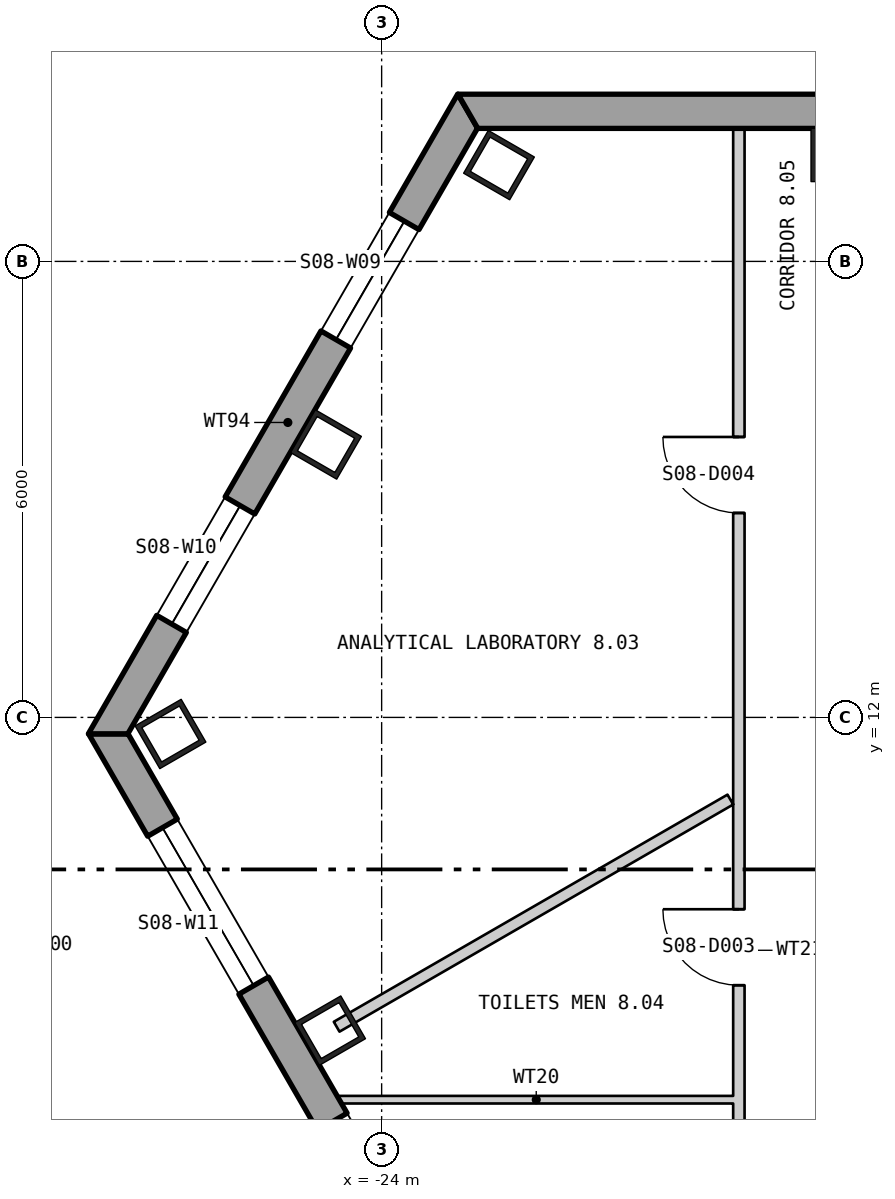
"""IFC4 building model, lengths in metres.
Left out: names, types, materials, properties, quantities, classifications, styles, units other than length and angle.
Written with IfcOpenShell. Run it as: python <this file> out.ifc"""

import sys

from ifc_helpers import new_model, si_unit, direction, frame, frame_2d, origin, origin_2d, place, context, subcontext, project, spatial, polyline, rectangle, hollow_rectangle, outline, extrude, element, fill, save


model = new_model("IFC4")
c1 = context("Model", 3, precision=1e-05, world=origin(), true_north=direction((0.0, 1.0)))
c2 = subcontext(c1, "Body", "Model", "MODEL_VIEW")
j1 = project(units=[si_unit("LENGTHUNIT", "METRE"), si_unit("PLANEANGLEUNIT", "RADIAN")], contexts=[c1])
p1 = place(None, origin())
s1 = spatial("IfcSite", under=j1, at=p1, CompositionType="ELEMENT")
p2 = place(p1, origin())
s2 = spatial("IfcBuilding", under=s1, at=p2, CompositionType="ELEMENT")
p3 = place(p2, frame((0.0, 0.0, 111.3)))
s3 = spatial("IfcBuildingStorey", under=s2, at=p3, CompositionType="ELEMENT", Elevation=111.3)
for number, where, z_axis, x_axis in (
    (1, (-18.026, 19.4, 0.0), (0.0, 0.0, 1.0), (-1.0, 0.0, 0.0)),
    (2, (-22.456, 19.267, 0.0), (0.0, 0.0, 1.0), (-0.5, -0.866, 0.0)),
    (3, (-24.732, 15.591, 0.0), (0.0, 0.0, 1.0), (-0.5, -0.866, 0.0)),
    (4, (-26.778, 11.782, 0.0), (0.0, 0.0, 1.0), (0.5, -0.866, 0.0)),
    (5, (-24.678, 7.879, 0.0), (0.0, 0.0, 1.0), (0.5, -0.866, 0.0)),
):
    element("IfcColumn", number, at=place(p3, frame(where, z_axis=z_axis, x_axis=x_axis)), inside=s3, PredefinedType="COLUMN", context=c2, shape_type="SweptSolid", body=[
        extrude(hollow_rectangle(XDim=0.65, YDim=0.7, WallThickness=0.065, at=origin_2d()), origin(), (0.0, 0.0, 1.0), 4.5),
    ])
p4 = place(p3, frame((22.865, 19.975, -0.4), z_axis=(0.0, 0.0, 1.0), x_axis=(-1.0, 0.0, 0.0)))
e6 = element("IfcWall", 6, at=p4, inside=s3, PredefinedType="SOLIDWALL", context=c2, shape_type="SweptSolid", body=[
    extrude(outline(polyline([(-0.13, -0.225), (45.86, -0.225), (45.6, 0.225), (0.13, 0.225), (-0.13, -0.225)])), origin(), (0.0, 0.0, 1.0), 4.5),
])
p5 = place(p4, frame((5.892, 0.0, 1.3)))
e7 = element("IfcOpeningElement", 7, at=p5, cuts=e6, PredefinedType="OPENING", context=c2, shape_type="SweptSolid", body=[
    extrude(rectangle(XDim=2.4, YDim=2.6, at=frame_2d((1.2, 1.3))), frame((0.0, 0.235, 0.0), z_axis=(0.0, -1.0, 0.0), x_axis=(1.0, 0.0, 0.0)), (0.0, 0.0, 1.0), 0.47),
])
p6 = place(p4, frame((10.399, 0.0, 1.3)))
e8 = element("IfcOpeningElement", 8, at=p6, cuts=e6, PredefinedType="OPENING", context=c2, shape_type="SweptSolid", body=[
    extrude(rectangle(XDim=2.4, YDim=2.6, at=frame_2d((1.2, 1.3))), frame((0.0, 0.235, 0.0), z_axis=(0.0, -1.0, 0.0), x_axis=(1.0, 0.0, 0.0)), (0.0, 0.0, 1.0), 0.47),
])
p7 = place(p4, frame((14.905, 0.0, 1.3)))
e9 = element("IfcOpeningElement", 9, at=p7, cuts=e6, PredefinedType="OPENING", context=c2, shape_type="SweptSolid", body=[
    extrude(rectangle(XDim=2.4, YDim=2.6, at=frame_2d((1.2, 1.3))), frame((0.0, 0.235, 0.0), z_axis=(0.0, -1.0, 0.0), x_axis=(1.0, 0.0, 0.0)), (0.0, 0.0, 1.0), 0.47),
])
p8 = place(p4, frame((19.412, 0.0, 1.3)))
e10 = element("IfcOpeningElement", 10, at=p8, cuts=e6, PredefinedType="OPENING", context=c2, shape_type="SweptSolid", body=[
    extrude(rectangle(XDim=2.4, YDim=2.6, at=frame_2d((1.2, 1.3))), frame((0.0, 0.235, 0.0), z_axis=(0.0, -1.0, 0.0), x_axis=(1.0, 0.0, 0.0)), (0.0, 0.0, 1.0), 0.47),
])
p9 = place(p4, frame((23.918, 0.0, 1.3)))
e11 = element("IfcOpeningElement", 11, at=p9, cuts=e6, PredefinedType="OPENING", context=c2, shape_type="SweptSolid", body=[
    extrude(rectangle(XDim=2.4, YDim=2.6, at=frame_2d((1.2, 1.3))), frame((0.0, 0.235, 0.0), z_axis=(0.0, -1.0, 0.0), x_axis=(1.0, 0.0, 0.0)), (0.0, 0.0, 1.0), 0.47),
])
p10 = place(p4, frame((28.425, 0.0, 1.3)))
e12 = element("IfcOpeningElement", 12, at=p10, cuts=e6, PredefinedType="OPENING", context=c2, shape_type="SweptSolid", body=[
    extrude(rectangle(XDim=2.4, YDim=2.6, at=frame_2d((1.2, 1.3))), frame((0.0, 0.235, 0.0), z_axis=(0.0, -1.0, 0.0), x_axis=(1.0, 0.0, 0.0)), (0.0, 0.0, 1.0), 0.47),
])
p11 = place(p4, frame((32.932, 0.0, 1.3)))
e13 = element("IfcOpeningElement", 13, at=p11, cuts=e6, PredefinedType="OPENING", context=c2, shape_type="SweptSolid", body=[
    extrude(rectangle(XDim=2.4, YDim=2.6, at=frame_2d((1.2, 1.3))), frame((0.0, 0.235, 0.0), z_axis=(0.0, -1.0, 0.0), x_axis=(1.0, 0.0, 0.0)), (0.0, 0.0, 1.0), 0.47),
])
p12 = place(p4, frame((37.438, 0.0, 1.3)))
e14 = element("IfcOpeningElement", 14, at=p12, cuts=e6, PredefinedType="OPENING", context=c2, shape_type="SweptSolid", body=[
    extrude(rectangle(XDim=2.4, YDim=2.6, at=frame_2d((1.2, 1.3))), frame((0.0, 0.235, 0.0), z_axis=(0.0, -1.0, 0.0), x_axis=(1.0, 0.0, 0.0)), (0.0, 0.0, 1.0), 0.47),
])
p13 = place(p3, frame((-22.869, 19.977, -0.4), z_axis=(0.0, 0.0, 1.0), x_axis=(-0.499998788182, -0.866026103427, 0.0)))
e15 = element("IfcWall", 15, at=p13, inside=s3, PredefinedType="SOLIDWALL", context=c2, shape_type="SweptSolid", body=[
    extrude(outline(polyline([(-0.13, -0.225), (9.59, -0.225), (9.33, 0.225), (0.13, 0.225), (-0.13, -0.225)])), origin(), (0.0, 0.0, 1.0), 4.5),
])
p14 = place(p13, frame((1.669, 0.0, 1.3)))
e16 = element("IfcOpeningElement", 16, at=p14, cuts=e15, PredefinedType="OPENING", context=c2, shape_type="SweptSolid", body=[
    extrude(rectangle(XDim=1.8, YDim=2.6, at=frame_2d((0.9, 1.3))), frame((0.0, 0.235, 0.0), z_axis=(0.0, -1.0, 0.0), x_axis=(1.0, 0.0, 0.0)), (0.0, 0.0, 1.0), 0.47),
])
p15 = place(p13, frame((5.991, 0.0, 1.3)))
e17 = element("IfcOpeningElement", 17, at=p15, cuts=e15, PredefinedType="OPENING", context=c2, shape_type="SweptSolid", body=[
    extrude(rectangle(XDim=1.8, YDim=2.6, at=frame_2d((0.9, 1.3))), frame((0.0, 0.235, 0.0), z_axis=(0.0, -1.0, 0.0), x_axis=(1.0, 0.0, 0.0)), (0.0, 0.0, 1.0), 0.47),
])
p16 = place(p3, frame((-27.595, 11.782, -0.18), z_axis=(0.0, 0.0, 1.0), x_axis=(0.500000141277, -0.866025322218, 0.0)))
e18 = element("IfcWall", 18, at=p16, inside=s3, PredefinedType="SOLIDWALL", context=c2, shape_type="SweptSolid", body=[
    extrude(outline(polyline([(-0.13, -0.225), (45.86, -0.225), (45.6, 0.225), (0.13, 0.225), (-0.13, -0.225)])), origin(), (0.0, 0.0, 1.0), 4.28),
])
p17 = place(p16, frame((1.424, 0.0, 1.08)))
e19 = element("IfcOpeningElement", 19, at=p17, cuts=e18, PredefinedType="OPENING", context=c2, shape_type="SweptSolid", body=[
    extrude(rectangle(XDim=2.4, YDim=2.6, at=frame_2d((1.2, 1.3))), frame((0.0, 0.235, 0.0), z_axis=(0.0, -1.0, 0.0), x_axis=(1.0, 0.0, 0.0)), (0.0, 0.0, 1.0), 0.47),
])
p18 = place(p16, frame((5.892, 0.0, 1.08)))
e20 = element("IfcOpeningElement", 20, at=p18, cuts=e18, PredefinedType="OPENING", context=c2, shape_type="SweptSolid", body=[
    extrude(rectangle(XDim=2.4, YDim=2.6, at=frame_2d((1.2, 1.3))), frame((0.0, 0.235, 0.0), z_axis=(0.0, -1.0, 0.0), x_axis=(1.0, 0.0, 0.0)), (0.0, 0.0, 1.0), 0.47),
])
p19 = place(p16, frame((10.399, 0.0, 1.08)))
e21 = element("IfcOpeningElement", 21, at=p19, cuts=e18, PredefinedType="OPENING", context=c2, shape_type="SweptSolid", body=[
    extrude(rectangle(XDim=2.4, YDim=2.6, at=frame_2d((1.2, 1.3))), frame((0.0, 0.235, 0.0), z_axis=(0.0, -1.0, 0.0), x_axis=(1.0, 0.0, 0.0)), (0.0, 0.0, 1.0), 0.47),
])
p20 = place(p16, frame((14.905, 0.0, 1.08)))
e22 = element("IfcOpeningElement", 22, at=p20, cuts=e18, PredefinedType="OPENING", context=c2, shape_type="SweptSolid", body=[
    extrude(rectangle(XDim=2.4, YDim=2.6, at=frame_2d((1.2, 1.3))), frame((0.0, 0.235, 0.0), z_axis=(0.0, -1.0, 0.0), x_axis=(1.0, 0.0, 0.0)), (0.0, 0.0, 1.0), 0.47),
])
p21 = place(p16, frame((19.412, 0.0, 1.08)))
e23 = element("IfcOpeningElement", 23, at=p21, cuts=e18, PredefinedType="OPENING", context=c2, shape_type="SweptSolid", body=[
    extrude(rectangle(XDim=2.4, YDim=2.6, at=frame_2d((1.2, 1.3))), frame((0.0, 0.235, 0.0), z_axis=(0.0, -1.0, 0.0), x_axis=(1.0, 0.0, 0.0)), (0.0, 0.0, 1.0), 0.47),
])
p22 = place(p16, frame((23.918, 0.0, 1.08)))
e24 = element("IfcOpeningElement", 24, at=p22, cuts=e18, PredefinedType="OPENING", context=c2, shape_type="SweptSolid", body=[
    extrude(rectangle(XDim=2.4, YDim=2.6, at=frame_2d((1.2, 1.3))), frame((0.0, 0.235, 0.0), z_axis=(0.0, -1.0, 0.0), x_axis=(1.0, 0.0, 0.0)), (0.0, 0.0, 1.0), 0.47),
])
p23 = place(p16, frame((28.425, 0.0, 1.08)))
e25 = element("IfcOpeningElement", 25, at=p23, cuts=e18, PredefinedType="OPENING", context=c2, shape_type="SweptSolid", body=[
    extrude(rectangle(XDim=2.4, YDim=2.6, at=frame_2d((1.2, 1.3))), frame((0.0, 0.235, 0.0), z_axis=(0.0, -1.0, 0.0), x_axis=(1.0, 0.0, 0.0)), (0.0, 0.0, 1.0), 0.47),
])
p24 = place(p16, frame((32.932, 0.0, 1.08)))
e26 = element("IfcOpeningElement", 26, at=p24, cuts=e18, PredefinedType="OPENING", context=c2, shape_type="SweptSolid", body=[
    extrude(rectangle(XDim=2.4, YDim=2.6, at=frame_2d((1.2, 1.3))), frame((0.0, 0.235, 0.0), z_axis=(0.0, -1.0, 0.0), x_axis=(1.0, 0.0, 0.0)), (0.0, 0.0, 1.0), 0.47),
])
p25 = place(p16, frame((37.438, 0.0, 1.08)))
e27 = element("IfcOpeningElement", 27, at=p25, cuts=e18, PredefinedType="OPENING", context=c2, shape_type="SweptSolid", body=[
    extrude(rectangle(XDim=2.4, YDim=2.6, at=frame_2d((1.2, 1.3))), frame((0.0, 0.235, 0.0), z_axis=(0.0, -1.0, 0.0), x_axis=(1.0, 0.0, 0.0)), (0.0, 0.0, 1.0), 0.47),
])
p26 = place(p16, frame((41.907, 0.0, 1.08)))
e28 = element("IfcOpeningElement", 28, at=p26, cuts=e18, PredefinedType="OPENING", context=c2, shape_type="SweptSolid", body=[
    extrude(rectangle(XDim=2.4, YDim=2.6, at=frame_2d((1.2, 1.3))), frame((0.0, 0.235, 0.0), z_axis=(0.0, -1.0, 0.0), x_axis=(1.0, 0.0, 0.0)), (0.0, 0.0, 1.0), 0.47),
])
p27 = place(p3, frame((-24.592, 7.93, 0.0), z_axis=(0.0, 0.0, 1.0), x_axis=(0.866146611104, 0.499790003975, 0.0)))
e29 = element("IfcWall", 29, at=p27, inside=s3, PredefinedType="PARTITIONING", context=c2, shape_type="SweptSolid", body=[
    extrude(rectangle(XDim=5.981, YDim=0.15, at=frame_2d((2.99, 0.0))), origin(), (0.0, 0.0, 1.0), 4.3),
])
p28 = place(p3, frame((-24.557, 6.97, 0.0), z_axis=(0.0, 0.0, 1.0), x_axis=(1.0, 0.0, 0.0)))
e30 = element("IfcWall", 30, at=p28, inside=s3, PredefinedType="PARTITIONING", context=c2, shape_type="SweptSolid", body=[
    extrude(rectangle(XDim=5.182, YDim=0.1, at=frame_2d((2.591, 0.0))), origin(), (0.0, 0.0, 1.0), 4.3),
])
p29 = place(p3, frame((-19.3, -1.875, 0.0), z_axis=(0.0, 0.0, 1.0), x_axis=(0.0, 1.0, 0.0)))
e31 = element("IfcWall", 31, at=p29, inside=s3, PredefinedType="PARTITIONING", context=c2, shape_type="SweptSolid", body=[
    extrude(rectangle(XDim=21.622, YDim=0.15, at=frame_2d((10.811, 0.0))), origin(), (0.0, 0.0, 1.0), 4.3),
])
p30 = place(p29, frame((4.595, 0.0, 0.0)))
e32 = element("IfcOpeningElement", 32, at=p30, cuts=e31, PredefinedType="OPENING", context=c2, shape_type="SweptSolid", body=[
    extrude(rectangle(XDim=1.0, YDim=2.1, at=frame_2d((0.5, 1.05))), frame((0.0, 0.085, 0.0), z_axis=(0.0, -1.0, 0.0), x_axis=(1.0, 0.0, 0.0)), (0.0, 0.0, 1.0), 0.17),
])
p31 = place(p29, frame((6.82, 0.0, 0.0)))
e33 = element("IfcOpeningElement", 33, at=p31, cuts=e31, PredefinedType="OPENING", context=c2, shape_type="SweptSolid", body=[
    extrude(rectangle(XDim=1.0, YDim=2.1, at=frame_2d((0.5, 1.05))), frame((0.0, 0.085, 0.0), z_axis=(0.0, -1.0, 0.0), x_axis=(1.0, 0.0, 0.0)), (0.0, 0.0, 1.0), 0.17),
])
p32 = place(p29, frame((10.351, 0.0, 0.0)))
e34 = element("IfcOpeningElement", 34, at=p32, cuts=e31, PredefinedType="OPENING", context=c2, shape_type="SweptSolid", body=[
    extrude(rectangle(XDim=1.0, YDim=2.1, at=frame_2d((0.5, 1.05))), frame((0.0, 0.085, 0.0), z_axis=(0.0, -1.0, 0.0), x_axis=(1.0, 0.0, 0.0)), (0.0, 0.0, 1.0), 0.17),
])
p33 = place(p29, frame((16.565, 0.0, 0.0)))
e35 = element("IfcOpeningElement", 35, at=p33, cuts=e31, PredefinedType="OPENING", context=c2, shape_type="SweptSolid", body=[
    extrude(rectangle(XDim=1.0, YDim=2.1, at=frame_2d((0.5, 1.05))), frame((0.0, 0.085, 0.0), z_axis=(0.0, -1.0, 0.0), x_axis=(1.0, 0.0, 0.0)), (0.0, 0.0, 1.0), 0.17),
])
p34 = place(p14, origin())
e36 = element("IfcWindow", 36, at=p34, inside=s3, PartitioningType="SINGLE_PANEL", PredefinedType="WINDOW", context=c2, shape_type="SweptSolid", body=[
    extrude(rectangle(XDim=1.8, YDim=2.6, at=frame_2d((0.9, 1.3))), frame((0.0, 0.105, 0.0), z_axis=(0.0, -1.0, 0.0), x_axis=(1.0, 0.0, 0.0)), (0.0, 0.0, 1.0), 0.06),
])
fill(e16, e36)
p35 = place(p15, origin())
e37 = element("IfcWindow", 37, at=p35, inside=s3, PartitioningType="SINGLE_PANEL", PredefinedType="WINDOW", context=c2, shape_type="SweptSolid", body=[
    extrude(rectangle(XDim=1.8, YDim=2.6, at=frame_2d((0.9, 1.3))), frame((0.0, 0.105, 0.0), z_axis=(0.0, -1.0, 0.0), x_axis=(1.0, 0.0, 0.0)), (0.0, 0.0, 1.0), 0.06),
])
fill(e17, e37)
p36 = place(p17, origin())
e38 = element("IfcWindow", 38, at=p36, inside=s3, PartitioningType="SINGLE_PANEL", PredefinedType="WINDOW", context=c2, shape_type="SweptSolid", body=[
    extrude(rectangle(XDim=2.4, YDim=2.6, at=frame_2d((1.2, 1.3))), frame((0.0, 0.105, 0.0), z_axis=(0.0, -1.0, 0.0), x_axis=(1.0, 0.0, 0.0)), (0.0, 0.0, 1.0), 0.06),
])
fill(e19, e38)
p37 = place(p18, origin())
e39 = element("IfcWindow", 39, at=p37, inside=s3, PartitioningType="SINGLE_PANEL", PredefinedType="WINDOW", context=c2, shape_type="SweptSolid", body=[
    extrude(rectangle(XDim=2.4, YDim=2.6, at=frame_2d((1.2, 1.3))), frame((0.0, 0.105, 0.0), z_axis=(0.0, -1.0, 0.0), x_axis=(1.0, 0.0, 0.0)), (0.0, 0.0, 1.0), 0.06),
])
fill(e20, e39)
p38 = place(p32, origin())
e40 = element("IfcDoor", 40, at=p38, inside=s3, OperationType="SINGLE_SWING_LEFT", PredefinedType="DOOR", context=c2, shape_type="SweptSolid", body=[
    extrude(rectangle(XDim=1.0, YDim=2.1, at=frame_2d((0.5, 1.05))), frame((0.0, 0.025, 0.0), z_axis=(0.0, -1.0, 0.0), x_axis=(1.0, 0.0, 0.0)), (0.0, 0.0, 1.0), 0.05),
])
fill(e34, e40)
p39 = place(p33, origin())
e41 = element("IfcDoor", 41, at=p39, inside=s3, OperationType="SINGLE_SWING_LEFT", PredefinedType="DOOR", context=c2, shape_type="SweptSolid", body=[
    extrude(rectangle(XDim=1.0, YDim=2.1, at=frame_2d((0.5, 1.05))), frame((0.0, 0.025, 0.0), z_axis=(0.0, -1.0, 0.0), x_axis=(1.0, 0.0, 0.0)), (0.0, 0.0, 1.0), 0.05),
])
fill(e35, e41)
save(model, sys.argv[1])
